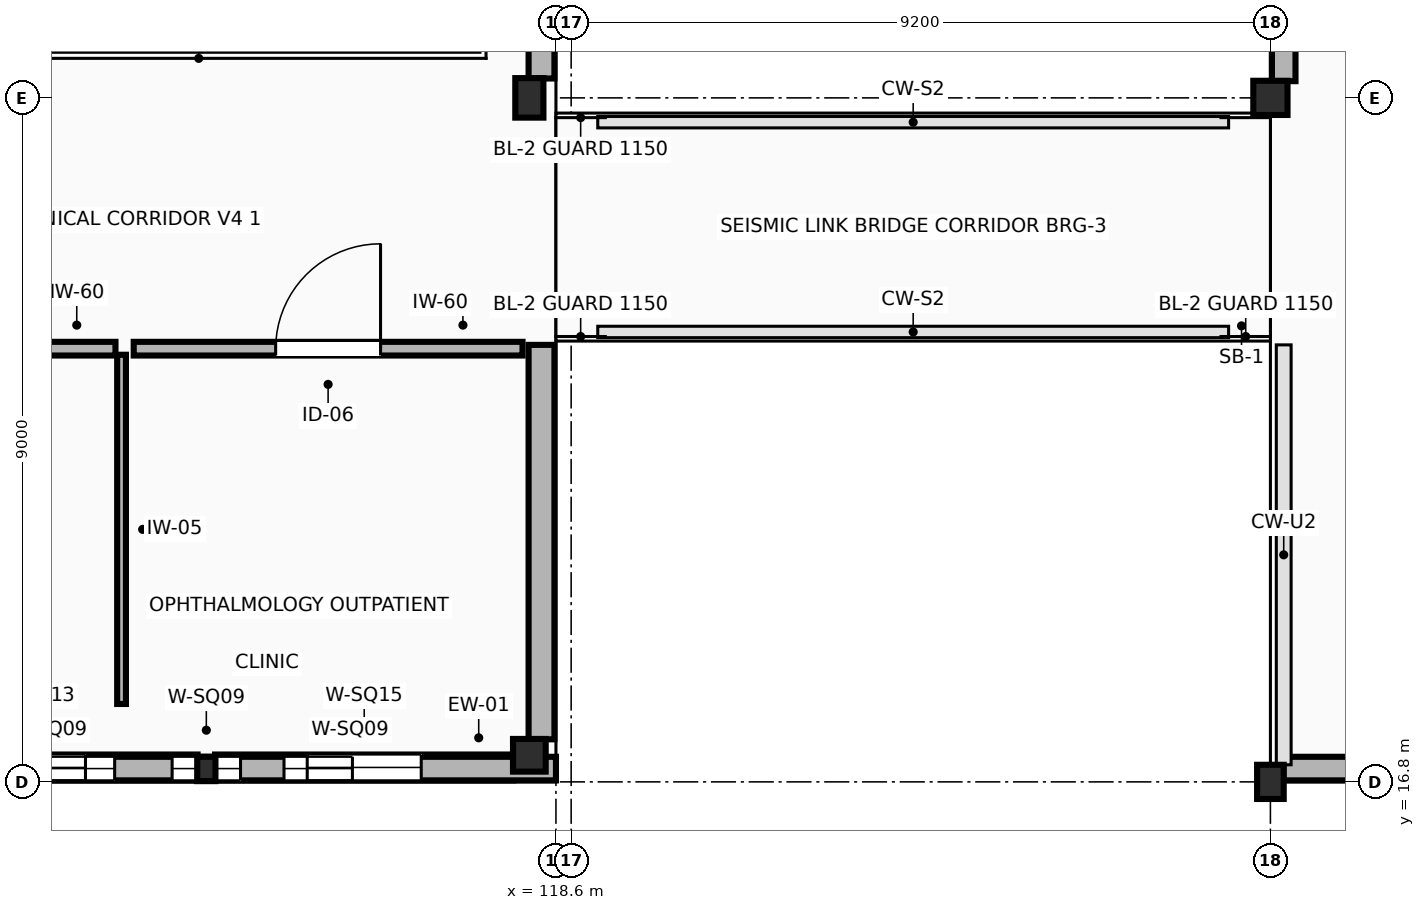
"""IFC4 building model, lengths in metres.
Left out: names, types, materials, properties, quantities, classifications, styles, units other than length and angle.
Written with IfcOpenShell. Run it as: python <this file> out.ifc"""

import sys

from ifc_helpers import new_model, si_unit, direction, frame, frame_2d, origin, origin_2d, place, context, subcontext, project, spatial, polyline, rectangle, outline, extrude, element, fill, save


model = new_model("IFC4")
c1 = context("Model", 3, precision=1e-05, world=origin(), true_north=direction((0.0, 1.0)))
c2 = subcontext(c1, "Body", "Model", "MODEL_VIEW")
j1 = project(units=[si_unit("LENGTHUNIT", "METRE"), si_unit("PLANEANGLEUNIT", "RADIAN")], contexts=[c1])
p1 = place(None, origin())
s1 = spatial("IfcSite", under=j1, at=p1, CompositionType="ELEMENT")
p2 = place(p1, origin())
s2 = spatial("IfcBuilding", under=s1, at=p2, CompositionType="ELEMENT")
p3 = place(p2, frame((0.0, 0.0, 13.8)))
s3 = spatial("IfcBuildingStorey", under=s2, at=p3, CompositionType="ELEMENT", Elevation=13.8)
p4 = place(p3, frame((118.25, 17.15, 0.0), z_axis=(0.0, 0.0, 1.0), x_axis=(1.0, 0.0, 0.0)))
e1 = element("IfcColumn", 1, at=p4, inside=s3, PredefinedType="COLUMN", context=c2, shape_type="SweptSolid", body=[
    extrude(rectangle(XDim=0.43, YDim=0.43, at=origin_2d()), origin(), (0.0, 0.0, 1.0), 4.2),
])
p5 = place(p3, frame((118.25, 25.8, 0.0), z_axis=(0.0, 0.0, 1.0), x_axis=(1.0, 0.0, 0.0)))
e2 = element("IfcColumn", 2, at=p5, inside=s3, PredefinedType="COLUMN", context=c2, shape_type="SweptSolid", body=[
    extrude(rectangle(XDim=0.37, YDim=0.52, at=origin_2d()), origin(), (0.0, 0.0, 1.0), 4.2),
])
p6 = place(p3, frame((128.0, 16.8, 0.0), z_axis=(0.0, 0.0, 1.0), x_axis=(1.0, 0.0, 0.0)))
e3 = element("IfcColumn", 3, at=p6, inside=s3, PredefinedType="COLUMN", context=c2, shape_type="SweptSolid", body=[
    extrude(rectangle(XDim=0.35, YDim=0.45, at=origin_2d()), origin(), (0.0, 0.0, 1.0), 4.2),
])
p7 = place(p3, frame((128.0, 25.8, 0.0), z_axis=(0.0, 0.0, 1.0), x_axis=(1.0, 0.0, 0.0)))
e4 = element("IfcColumn", 4, at=p7, inside=s3, PredefinedType="COLUMN", context=c2, shape_type="SweptSolid", body=[
    extrude(rectangle(XDim=0.45, YDim=0.45, at=origin_2d()), origin(), (0.0, 0.0, 1.0), 4.2),
])
p8 = place(p3, frame((114.0, 16.97, 0.0), z_axis=(0.0, 0.0, 1.0), x_axis=(1.0, 0.0, 0.0)))
e5 = element("IfcColumn", 5, at=p8, inside=s3, PredefinedType="PILASTER", context=c2, shape_type="SweptSolid", body=[
    extrude(rectangle(XDim=0.24, YDim=0.32, at=origin_2d()), origin(), (0.0, 0.0, 1.0), 4.2),
])
p9 = place(p3, frame((109.635, 16.99, 0.0), z_axis=(0.0, 0.0, 1.0), x_axis=(1.0, 0.0, 0.0)))
e6 = element("IfcWall", 6, at=p9, inside=s3, PredefinedType="STANDARD", context=c2, shape_type="SweptSolid", body=[
    extrude(rectangle(XDim=4.25, YDim=0.34, at=frame_2d((2.125, 0.0))), origin(), (0.0, 0.0, 1.0), 3.92),
])
p10 = place(p9, frame((1.475, 0.0, 1.15)))
e7 = element("IfcOpeningElement", 7, at=p10, cuts=e6, PredefinedType="OPENING", context=c2, shape_type="SweptSolid", body=[
    extrude(rectangle(XDim=1.3, YDim=1.3, at=frame_2d((0.65, 0.65))), frame((0.0, 0.18, 0.0), z_axis=(0.0, -1.0, 0.0), x_axis=(1.0, 0.0, 0.0)), (0.0, 0.0, 1.0), 0.36),
])
p11 = place(p3, frame((114.115, 16.99, 0.0), z_axis=(0.0, 0.0, 1.0), x_axis=(1.0, 0.0, 0.0)))
e8 = element("IfcWall", 8, at=p11, inside=s3, PredefinedType="STANDARD", context=c2, shape_type="SweptSolid", body=[
    extrude(rectangle(XDim=3.925, YDim=0.34, at=frame_2d((1.962, 0.0))), origin(), (0.0, 0.0, 1.0), 3.92),
])
p12 = place(p11, frame((1.212, 0.0, 1.15)))
e9 = element("IfcOpeningElement", 9, at=p12, cuts=e8, PredefinedType="OPENING", context=c2, shape_type="SweptSolid", body=[
    extrude(rectangle(XDim=1.5, YDim=1.5, at=frame_2d((0.75, 0.75))), frame((0.0, 0.18, 0.0), z_axis=(0.0, -1.0, 0.0), x_axis=(1.0, 0.0, 0.0)), (0.0, 0.0, 1.0), 0.36),
])
p13 = place(p3, frame((118.41, 17.36, 0.0), z_axis=(0.0, 0.0, 1.0), x_axis=(0.0, 1.0, 0.0)))
e10 = element("IfcWall", 10, at=p13, inside=s3, PredefinedType="STANDARD", context=c2, shape_type="SweptSolid", body=[
    extrude(rectangle(XDim=5.19, YDim=0.34, at=frame_2d((2.595, 0.0))), origin(), (0.0, 0.0, 1.0), 3.035),
])
p14 = place(p3, frame((118.41, 26.055, 0.0), z_axis=(0.0, 0.0, 1.0), x_axis=(0.0, 1.0, 0.0)))
e11 = element("IfcWall", 11, at=p14, inside=s3, PredefinedType="STANDARD", context=c2, shape_type="SweptSolid", body=[
    extrude(rectangle(XDim=7.96, YDim=0.34, at=frame_2d((3.98, 0.0))), origin(), (0.0, 0.0, 1.0), 3.035),
])
p15 = place(p3, frame((128.17, 16.975, 0.0), z_axis=(0.0, 0.0, 1.0), x_axis=(1.0, 0.0, 0.0)))
e12 = element("IfcWall", 12, at=p15, inside=s3, PredefinedType="STANDARD", context=c2, shape_type="SweptSolid", body=[
    extrude(rectangle(XDim=8.785, YDim=0.31, at=frame_2d((4.393, 0.0))), origin(), (0.0, 0.0, 1.0), 3.255),
])
p16 = place(p15, frame((1.885, 0.0, 0.95)))
e13 = element("IfcOpeningElement", 13, at=p16, cuts=e12, PredefinedType="OPENING", context=c2, shape_type="SweptSolid", body=[
    extrude(rectangle(XDim=1.5, YDim=1.65, at=frame_2d((0.75, 0.825))), frame((0.0, 0.165, 0.0), z_axis=(0.0, -1.0, 0.0), x_axis=(1.0, 0.0, 0.0)), (0.0, 0.0, 1.0), 0.33),
])
p17 = place(p15, frame((5.399, 0.0, 0.95)))
e14 = element("IfcOpeningElement", 14, at=p17, cuts=e12, PredefinedType="OPENING", context=c2, shape_type="SweptSolid", body=[
    extrude(rectangle(XDim=1.5, YDim=1.65, at=frame_2d((0.75, 0.825))), frame((0.0, 0.165, 0.0), z_axis=(0.0, -1.0, 0.0), x_axis=(1.0, 0.0, 0.0)), (0.0, 0.0, 1.0), 0.33),
])
p18 = place(p3, frame((128.175, 34.355, 0.0), z_axis=(0.0, 0.0, 1.0), x_axis=(0.0, -1.0, 0.0)))
e15 = element("IfcWall", 15, at=p18, inside=s3, PredefinedType="STANDARD", context=c2, shape_type="SweptSolid", body=[
    extrude(rectangle(XDim=8.335, YDim=0.31, at=frame_2d((4.167, 0.0))), origin(), (0.0, 0.0, 1.0), 3.365),
])
p19 = place(p18, frame((3.292, 0.0, 0.95)))
e16 = element("IfcOpeningElement", 16, at=p19, cuts=e15, PredefinedType="OPENING", context=c2, shape_type="SweptSolid", body=[
    extrude(rectangle(XDim=1.75, YDim=1.65, at=frame_2d((0.875, 0.825))), frame((0.0, 0.165, 0.0), z_axis=(0.0, -1.0, 0.0), x_axis=(1.0, 0.0, 0.0)), (0.0, 0.0, 1.0), 0.33),
])
p20 = place(p3, frame((109.4, 16.975, 4.2), z_axis=(0.0, 0.0, 1.0), x_axis=(1.0, 0.0, 0.0)))
e17 = element("IfcWall", 17, at=p20, inside=s3, PredefinedType="STANDARD", context=c2, shape_type="SweptSolid", body=[
    extrude(outline(polyline([(0.0, 0.0), (9.2, 0.0), (9.2, 0.0), (4.6, 7.19), (0.0, 0.0), (0.0, 0.0)])), frame((0.0, 0.155, 0.0), z_axis=(0.0, -1.0, 0.0), x_axis=(1.0, 0.0, 0.0)), (0.0, 0.0, 1.0), 0.31),
])
p21 = place(p20, frame((2.494, 0.0, 0.75)))
e18 = element("IfcOpeningElement", 18, at=p21, cuts=e17, PredefinedType="OPENING", context=c2, shape_type="SweptSolid", body=[
    extrude(rectangle(XDim=0.9, YDim=0.9, at=frame_2d((0.45, 0.45))), frame((0.0, 0.165, 0.0), z_axis=(0.0, -1.0, 0.0), x_axis=(1.0, 0.0, 0.0)), (0.0, 0.0, 1.0), 0.33),
])
p22 = place(p20, frame((5.622, 0.0, 1.55)))
e19 = element("IfcOpeningElement", 19, at=p22, cuts=e17, PredefinedType="OPENING", context=c2, shape_type="SweptSolid", body=[
    extrude(rectangle(XDim=0.9, YDim=0.9, at=frame_2d((0.45, 0.45))), frame((0.0, 0.165, 0.0), z_axis=(0.0, -1.0, 0.0), x_axis=(1.0, 0.0, 0.0)), (0.0, 0.0, 1.0), 0.33),
])
p23 = place(p20, frame((4.15, 0.0, 3.35)))
e20 = element("IfcOpeningElement", 20, at=p23, cuts=e17, PredefinedType="OPENING", context=c2, shape_type="SweptSolid", body=[
    extrude(rectangle(XDim=0.9, YDim=0.9, at=frame_2d((0.45, 0.45))), frame((0.0, 0.165, 0.0), z_axis=(0.0, -1.0, 0.0), x_axis=(1.0, 0.0, 0.0)), (0.0, 0.0, 1.0), 0.33),
])
p24 = place(p3, frame((112.885, 22.42, 0.0), z_axis=(0.0, 0.0, 1.0), x_axis=(0.0, -1.0, 0.0)))
e21 = element("IfcWall", 21, at=p24, inside=s3, PredefinedType="PARTITIONING", context=c2, shape_type="SweptSolid", body=[
    extrude(rectangle(XDim=4.595, YDim=0.115, at=frame_2d((2.297, 0.0))), origin(), (0.0, 0.0, 1.0), 3.92),
])
p25 = place(p3, frame((109.087, 22.5, 0.0), z_axis=(0.0, 0.0, 1.0), x_axis=(1.0, 0.0, 0.0)))
e22 = element("IfcWall", 22, at=p25, inside=s3, PredefinedType="PARTITIONING", context=c2, shape_type="SweptSolid", body=[
    extrude(rectangle(XDim=3.718, YDim=0.18, at=frame_2d((1.859, 0.0))), origin(), (0.0, 0.0, 1.0), 3.92),
])
p26 = place(p25, frame((1.319, 0.0, 0.0)))
e23 = element("IfcOpeningElement", 23, at=p26, cuts=e22, PredefinedType="OPENING", context=c2, shape_type="SweptSolid", body=[
    extrude(rectangle(XDim=1.08, YDim=2.2, at=frame_2d((0.54, 1.1))), frame((0.0, 0.1, 0.0), z_axis=(0.0, -1.0, 0.0), x_axis=(1.0, 0.0, 0.0)), (0.0, 0.0, 1.0), 0.2),
])
p27 = place(p3, frame((113.045, 22.5, 0.0), z_axis=(0.0, 0.0, 1.0), x_axis=(1.0, 0.0, 0.0)))
e24 = element("IfcWall", 24, at=p27, inside=s3, PredefinedType="PARTITIONING", context=c2, shape_type="SweptSolid", body=[
    extrude(rectangle(XDim=5.115, YDim=0.18, at=frame_2d((2.558, 0.0))), origin(), (0.0, 0.0, 1.0), 3.92),
])
p28 = place(p27, frame((1.868, 0.0, 0.0)))
e25 = element("IfcOpeningElement", 25, at=p28, cuts=e24, PredefinedType="OPENING", context=c2, shape_type="SweptSolid", body=[
    extrude(rectangle(XDim=1.38, YDim=2.25, at=frame_2d((0.69, 1.125))), frame((0.0, 0.1, 0.0), z_axis=(0.0, -1.0, 0.0), x_axis=(1.0, 0.0, 0.0)), (0.0, 0.0, 1.0), 0.2),
])
p29 = place(p10, origin())
e26 = element("IfcWindow", 26, at=p29, inside=s3, PartitioningType="SINGLE_PANEL", PredefinedType="WINDOW", context=c2, shape_type="SweptSolid", body=[
    extrude(rectangle(XDim=1.3, YDim=1.3, at=frame_2d((0.65, 0.65))), frame((0.0, 0.03, 0.0), z_axis=(0.0, -1.0, 0.0), x_axis=(1.0, 0.0, 0.0)), (0.0, 0.0, 1.0), 0.06),
])
fill(e7, e26)
p30 = place(p12, origin())
e27 = element("IfcWindow", 27, at=p30, inside=s3, PartitioningType="SINGLE_PANEL", PredefinedType="WINDOW", context=c2, shape_type="SweptSolid", body=[
    extrude(rectangle(XDim=1.5, YDim=1.5, at=frame_2d((0.75, 0.75))), frame((0.0, 0.03, 0.0), z_axis=(0.0, -1.0, 0.0), x_axis=(1.0, 0.0, 0.0)), (0.0, 0.0, 1.0), 0.06),
])
fill(e9, e27)
p31 = place(p21, origin())
e28 = element("IfcWindow", 28, at=p31, inside=s3, PartitioningType="SINGLE_PANEL", PredefinedType="WINDOW", context=c2, shape_type="SweptSolid", body=[
    extrude(rectangle(XDim=0.9, YDim=0.9, at=frame_2d((0.45, 0.45))), frame((0.0, 0.03, 0.0), z_axis=(0.0, -1.0, 0.0), x_axis=(1.0, 0.0, 0.0)), (0.0, 0.0, 1.0), 0.06),
])
fill(e18, e28)
p32 = place(p22, origin())
e29 = element("IfcWindow", 29, at=p32, inside=s3, PartitioningType="SINGLE_PANEL", PredefinedType="WINDOW", context=c2, shape_type="SweptSolid", body=[
    extrude(rectangle(XDim=0.9, YDim=0.9, at=frame_2d((0.45, 0.45))), frame((0.0, 0.03, 0.0), z_axis=(0.0, -1.0, 0.0), x_axis=(1.0, 0.0, 0.0)), (0.0, 0.0, 1.0), 0.06),
])
fill(e19, e29)
p33 = place(p23, origin())
e30 = element("IfcWindow", 30, at=p33, inside=s3, PartitioningType="SINGLE_PANEL", PredefinedType="WINDOW", context=c2, shape_type="SweptSolid", body=[
    extrude(rectangle(XDim=0.9, YDim=0.9, at=frame_2d((0.45, 0.45))), frame((0.0, 0.03, 0.0), z_axis=(0.0, -1.0, 0.0), x_axis=(1.0, 0.0, 0.0)), (0.0, 0.0, 1.0), 0.06),
])
fill(e20, e30)
p34 = place(p28, origin())
e31 = element("IfcDoor", 31, at=p34, inside=s3, OperationType="SINGLE_SWING_RIGHT", PredefinedType="DOOR", context=c2, shape_type="SweptSolid", body=[
    extrude(rectangle(XDim=1.38, YDim=2.25, at=frame_2d((0.69, 1.125))), frame((0.0, 0.025, 0.0), z_axis=(0.0, -1.0, 0.0), x_axis=(1.0, 0.0, 0.0)), (0.0, 0.0, 1.0), 0.05),
])
fill(e25, e31)
save(model, sys.argv[1])
